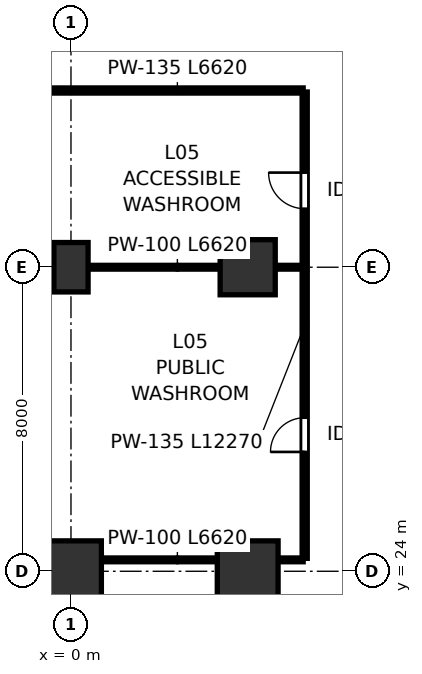
"""IFC4 building model, lengths in metres.
Left out: names, types, materials, properties, quantities, classifications, styles, units other than length and angle.
Written with IfcOpenShell. Run it as: python <this file> out.ifc"""

import sys

from ifc_helpers import new_model, si_unit, direction, frame, frame_2d, origin, origin_2d, place, context, subcontext, project, spatial, rectangle, extrude, source, transform, mapped, element, fill, save


model = new_model("IFC4")
c1 = context("Model", 3, precision=1e-05, world=origin(), true_north=direction((0.0, 1.0)))
c2 = subcontext(c1, "Body", "Model", "MODEL_VIEW")
j1 = project(units=[si_unit("LENGTHUNIT", "METRE"), si_unit("PLANEANGLEUNIT", "RADIAN")], contexts=[c1])
p1 = place(None, origin())
s1 = spatial("IfcSite", under=j1, at=p1, CompositionType="ELEMENT")
p2 = place(p1, origin())
s2 = spatial("IfcBuilding", under=s1, at=p2, CompositionType="ELEMENT")
p3 = place(p2, frame((0.0, 0.0, 22.2)))
s3 = spatial("IfcBuildingStorey", under=s2, at=p3, CompositionType="ELEMENT", Elevation=22.2)
m1 = source(origin(), c2, "Body", "SweptSolid", [
    extrude(rectangle(XDim=1.6, YDim=1.6, at=origin_2d()), origin(), (0.0, 0.0, 1.0), 5.799),
])
p4 = place(p3, frame((0.0, 24.0, 0.001), z_axis=(0.0, 0.0, 1.0), x_axis=(1.0, 0.0, 0.0)))
e1 = element("IfcColumn", 1, at=p4, inside=s3, PredefinedType="COLUMN", context=c2, shape_type="MappedRepresentation", body=[
    mapped(m1, transform((0.0, 0.0, 0.0), scale=1.0)),
])
m2 = source(origin(), c2, "Body", "SweptSolid", [
    extrude(rectangle(XDim=0.9, YDim=1.3, at=origin_2d()), origin(), (0.0, 0.0, 1.0), 5.799),
])
p5 = place(p3, frame((0.0, 32.0, 0.001), z_axis=(0.0, 0.0, 1.0), x_axis=(1.0, 0.0, 0.0)))
e2 = element("IfcColumn", 2, at=p5, inside=s3, PredefinedType="PILASTER", context=c2, shape_type="MappedRepresentation", body=[
    mapped(m2, transform((0.0, 0.0, 0.0), scale=1.0)),
])
p6 = place(p3, frame((4.65, 24.0, 0.001), z_axis=(0.0, 0.0, 1.0), x_axis=(1.0, 0.0, 0.0)))
e3 = element("IfcColumn", 3, at=p6, inside=s3, PredefinedType="COLUMN", context=c2, shape_type="MappedRepresentation", body=[
    mapped(m1, transform((0.0, 0.0, 0.0), scale=1.0)),
])
m3 = source(origin(), c2, "Body", "SweptSolid", [
    extrude(rectangle(XDim=1.45, YDim=1.45, at=origin_2d()), origin(), (0.0, 0.0, 1.0), 5.799),
])
p7 = place(p3, frame((4.65, 32.0, 0.001), z_axis=(0.0, 0.0, 1.0), x_axis=(1.0, 0.0, 0.0)))
e4 = element("IfcColumn", 4, at=p7, inside=s3, PredefinedType="COLUMN", context=c2, shape_type="MappedRepresentation", body=[
    mapped(m3, transform((0.0, 0.0, 0.0), scale=1.0)),
])
p8 = place(p3, frame((-0.51, 24.3, 0.0), z_axis=(0.0, 0.0, 1.0), x_axis=(1.0, 0.0, 0.0)))
e5 = element("IfcWall", 5, at=p8, inside=s3, PredefinedType="PARTITIONING", context=c2, shape_type="SweptSolid", body=[
    extrude(rectangle(XDim=6.62, YDim=0.1, at=frame_2d((3.31, 0.0))), origin(), (0.0, 0.0, 1.0), 4.65),
])
p9 = place(p3, frame((-0.51, 36.65, 0.0), z_axis=(0.0, 0.0, 1.0), x_axis=(1.0, 0.0, 0.0)))
e6 = element("IfcWall", 6, at=p9, inside=s3, PredefinedType="PARTITIONING", context=c2, shape_type="SweptSolid", body=[
    extrude(rectangle(XDim=6.62, YDim=0.135, at=frame_2d((3.31, 0.0))), origin(), (0.0, 0.0, 1.0), 4.655),
])
p10 = place(p3, frame((-0.51, 32.0, 0.0), z_axis=(0.0, 0.0, 1.0), x_axis=(1.0, 0.0, 0.0)))
e7 = element("IfcWall", 7, at=p10, inside=s3, PredefinedType="PARTITIONING", context=c2, shape_type="SweptSolid", body=[
    extrude(rectangle(XDim=6.62, YDim=0.1, at=frame_2d((3.31, 0.0))), origin(), (0.0, 0.0, 1.0), 4.655),
])
p11 = place(p3, frame((6.15, 24.34, 0.0), z_axis=(0.0, 0.0, 1.0), x_axis=(0.0, 1.0, 0.0)))
e8 = element("IfcWall", 8, at=p11, inside=s3, PredefinedType="PARTITIONING", context=c2, shape_type="SweptSolid", body=[
    extrude(rectangle(XDim=12.27, YDim=0.135, at=frame_2d((6.135, 0.0))), origin(), (0.0, 0.0, 1.0), 4.655),
])
p12 = place(p11, frame((2.8, 0.0, 0.0)))
e9 = element("IfcOpeningElement", 9, at=p12, cuts=e8, PredefinedType="OPENING", context=c2, shape_type="SweptSolid", body=[
    extrude(rectangle(XDim=0.9, YDim=2.15, at=frame_2d((0.45, 1.075))), frame((0.0, 0.078, 0.0), z_axis=(0.0, -1.0, 0.0), x_axis=(1.0, 0.0, 0.0)), (0.0, 0.0, 1.0), 0.155),
])
p13 = place(p11, frame((9.2, 0.0, 0.0)))
e10 = element("IfcOpeningElement", 10, at=p13, cuts=e8, PredefinedType="OPENING", context=c2, shape_type="SweptSolid", body=[
    extrude(rectangle(XDim=0.95, YDim=2.15, at=frame_2d((0.475, 1.075))), frame((0.0, 0.078, 0.0), z_axis=(0.0, -1.0, 0.0), x_axis=(1.0, 0.0, 0.0)), (0.0, 0.0, 1.0), 0.155),
])
m4 = source(origin(), c2, "Body", "SweptSolid", [
    extrude(rectangle(XDim=0.9, YDim=2.15, at=frame_2d((0.45, 1.075))), frame((0.0, 0.025, 0.0), z_axis=(0.0, -1.0, 0.0), x_axis=(1.0, 0.0, 0.0)), (0.0, 0.0, 1.0), 0.05),
])
p14 = place(p12, origin())
e11 = element("IfcDoor", 11, at=p14, inside=s3, OperationType="SINGLE_SWING_LEFT", PredefinedType="DOOR", context=c2, shape_type="MappedRepresentation", body=[
    mapped(m4, transform((0.0, 0.0, 0.0), scale=1.0)),
])
fill(e9, e11)
m5 = source(origin(), c2, "Body", "SweptSolid", [
    extrude(rectangle(XDim=0.95, YDim=2.15, at=frame_2d((0.475, 1.075))), frame((0.0, 0.025, 0.0), z_axis=(0.0, -1.0, 0.0), x_axis=(1.0, 0.0, 0.0)), (0.0, 0.0, 1.0), 0.05),
])
p15 = place(p13, origin())
e12 = element("IfcDoor", 12, at=p15, inside=s3, OperationType="SINGLE_SWING_RIGHT", PredefinedType="DOOR", context=c2, shape_type="MappedRepresentation", body=[
    mapped(m5, transform((0.0, 0.0, 0.0), scale=1.0)),
])
fill(e10, e12)
save(model, sys.argv[1])
